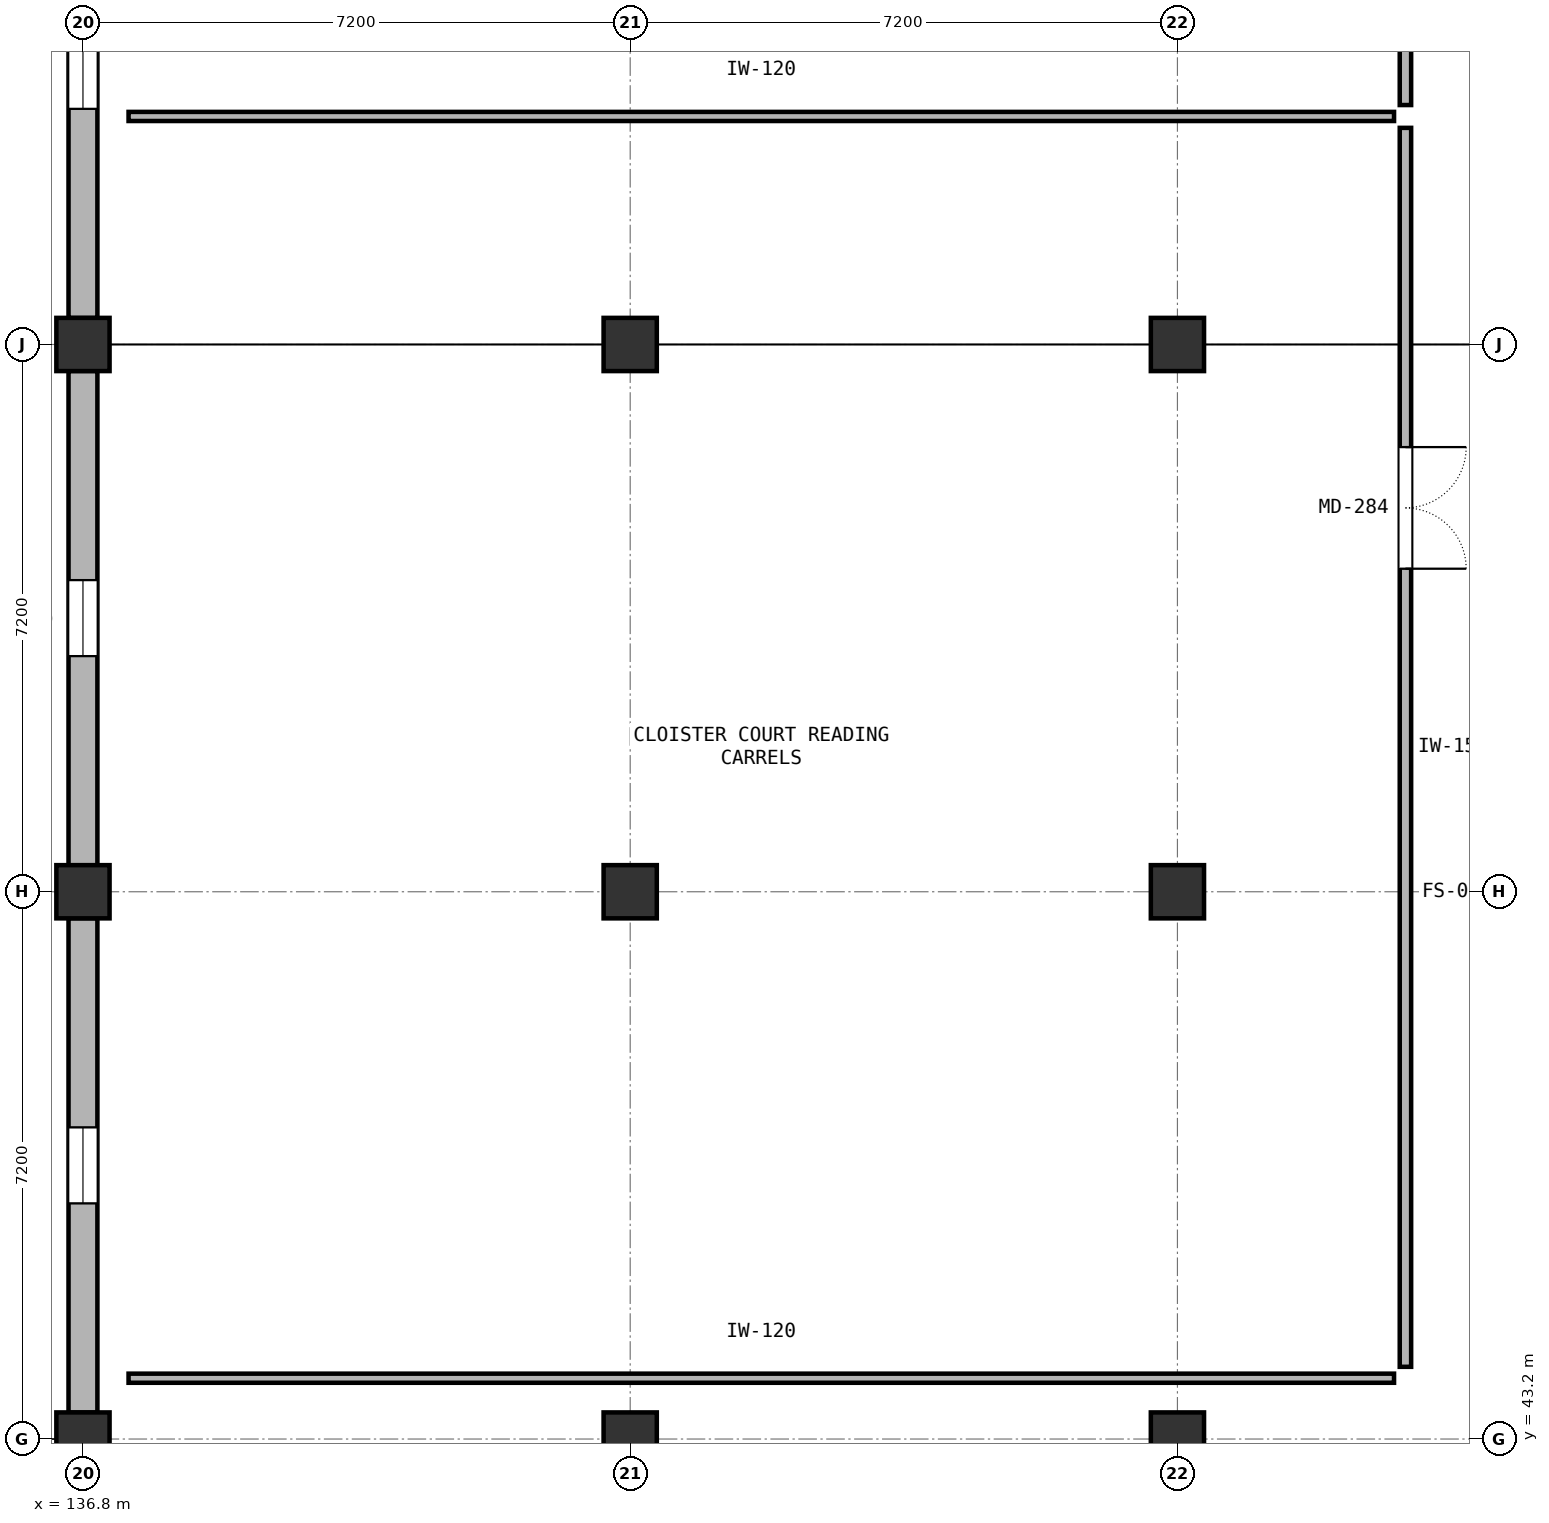
"""IFC4 building model, lengths in metres.
Left out: names, types, materials, properties, quantities, classifications, styles, units other than length and angle.
Written with IfcOpenShell. Run it as: python <this file> out.ifc"""

import sys

from ifc_helpers import new_model, si_unit, direction, frame, frame_2d, origin, origin_2d, place, context, subcontext, project, spatial, rectangle, extrude, element, fill, save


model = new_model("IFC4")
c1 = context("Model", 3, precision=1e-05, world=origin(), true_north=direction((0.0, 1.0)))
c2 = subcontext(c1, "Body", "Model", "MODEL_VIEW")
j1 = project(units=[si_unit("LENGTHUNIT", "METRE"), si_unit("PLANEANGLEUNIT", "RADIAN")], contexts=[c1])
p1 = place(None, origin())
s1 = spatial("IfcSite", under=j1, at=p1, CompositionType="ELEMENT")
p2 = place(p1, origin())
s2 = spatial("IfcBuilding", under=s1, at=p2, CompositionType="ELEMENT")
p3 = place(p2, frame((0.0, 0.0, 10.2)))
s3 = spatial("IfcBuildingStorey", under=s2, at=p3, CompositionType="ELEMENT", Elevation=10.2)
for number, where, z_axis, x_axis in (
    (1, (136.8, 43.2, 0.0), (0.0, 0.0, 1.0), (1.0, 0.0, 0.0)),
    (2, (136.8, 50.4, 0.0), (0.0, 0.0, 1.0), (1.0, 0.0, 0.0)),
    (3, (136.8, 57.6, 0.0), (0.0, 0.0, 1.0), (1.0, 0.0, 0.0)),
    (4, (144.0, 43.2, 0.0), (0.0, 0.0, 1.0), (1.0, 0.0, 0.0)),
    (5, (144.0, 50.4, 0.0), (0.0, 0.0, 1.0), (1.0, 0.0, 0.0)),
    (6, (144.0, 57.6, 0.0), (0.0, 0.0, 1.0), (1.0, 0.0, 0.0)),
    (7, (151.2, 43.2, 0.0), (0.0, 0.0, 1.0), (1.0, 0.0, 0.0)),
    (8, (151.2, 50.4, 0.0), (0.0, 0.0, 1.0), (1.0, 0.0, 0.0)),
    (9, (151.2, 57.6, 0.0), (0.0, 0.0, 1.0), (1.0, 0.0, 0.0)),
):
    element("IfcColumn", number, at=place(p3, frame(where, z_axis=z_axis, x_axis=x_axis)), inside=s3, PredefinedType="COLUMN", context=c2, shape_type="SweptSolid", body=[
        extrude(rectangle(XDim=0.7, YDim=0.7, at=origin_2d()), origin(), (0.0, 0.0, 1.0), 4.2),
    ])
p4 = place(p3, frame((136.8, 43.548, 0.0), z_axis=(0.0, 0.0, 1.0), x_axis=(0.0, 1.0, 0.0)))
e10 = element("IfcWall", 10, at=p4, inside=s3, PredefinedType="SOLIDWALL", context=c2, shape_type="SweptSolid", body=[
    extrude(rectangle(XDim=6.504, YDim=0.38, at=frame_2d((3.252, 0.0))), origin(), (0.0, 0.0, 1.0), 3.04),
])
p5 = place(p4, frame((2.752, 0.0, 0.7)))
e11 = element("IfcOpeningElement", 11, at=p5, cuts=e10, PredefinedType="OPENING", context=c2, shape_type="SweptSolid", body=[
    extrude(rectangle(XDim=1.0, YDim=2.0, at=frame_2d((0.5, 1.0))), frame((0.0, 0.2, 0.0), z_axis=(0.0, -1.0, 0.0), x_axis=(1.0, 0.0, 0.0)), (0.0, 0.0, 1.0), 0.4),
])
p6 = place(p3, frame((136.8, 50.748, 0.0), z_axis=(0.0, 0.0, 1.0), x_axis=(0.0, 1.0, 0.0)))
e12 = element("IfcWall", 12, at=p6, inside=s3, PredefinedType="SOLIDWALL", context=c2, shape_type="SweptSolid", body=[
    extrude(rectangle(XDim=6.504, YDim=0.38, at=frame_2d((3.252, 0.0))), origin(), (0.0, 0.0, 1.0), 3.04),
])
p7 = place(p6, frame((2.752, 0.0, 0.7)))
e13 = element("IfcOpeningElement", 13, at=p7, cuts=e12, PredefinedType="OPENING", context=c2, shape_type="SweptSolid", body=[
    extrude(rectangle(XDim=1.0, YDim=2.0, at=frame_2d((0.5, 1.0))), frame((0.0, 0.2, 0.0), z_axis=(0.0, -1.0, 0.0), x_axis=(1.0, 0.0, 0.0)), (0.0, 0.0, 1.0), 0.4),
])
p8 = place(p3, frame((136.8, 57.948, 0.0), z_axis=(0.0, 0.0, 1.0), x_axis=(0.0, 1.0, 0.0)))
e14 = element("IfcWall", 14, at=p8, inside=s3, PredefinedType="SOLIDWALL", context=c2, shape_type="SweptSolid", body=[
    extrude(rectangle(XDim=6.504, YDim=0.38, at=frame_2d((3.252, 0.0))), origin(), (0.0, 0.0, 1.0), 3.04),
])
p9 = place(p8, frame((2.752, 0.0, 0.7)))
e15 = element("IfcOpeningElement", 15, at=p9, cuts=e14, PredefinedType="OPENING", context=c2, shape_type="SweptSolid", body=[
    extrude(rectangle(XDim=1.0, YDim=2.0, at=frame_2d((0.5, 1.0))), frame((0.0, 0.2, 0.0), z_axis=(0.0, -1.0, 0.0), x_axis=(1.0, 0.0, 0.0)), (0.0, 0.0, 1.0), 0.4),
])
p10 = place(p3, frame((154.2, 60.45, 0.0), z_axis=(0.0, 0.0, 1.0), x_axis=(0.0, -1.0, 0.0)))
e16 = element("IfcWall", 16, at=p10, inside=s3, PredefinedType="PARTITIONING", context=c2, shape_type="SweptSolid", body=[
    extrude(rectangle(XDim=16.3, YDim=0.15, at=frame_2d((8.15, 0.0))), origin(), (0.0, 0.0, 1.0), 3.08),
])
p11 = place(p10, frame((4.2, 0.0, 0.0)))
e17 = element("IfcOpeningElement", 17, at=p11, cuts=e16, PredefinedType="OPENING", context=c2, shape_type="SweptSolid", body=[
    extrude(rectangle(XDim=1.6, YDim=2.2, at=frame_2d((0.8, 1.1))), frame((0.0, 0.085, 0.0), z_axis=(0.0, -1.0, 0.0), x_axis=(1.0, 0.0, 0.0)), (0.0, 0.0, 1.0), 0.17),
])
p12 = place(p3, frame((137.4, 44.0, 0.0), z_axis=(0.0, 0.0, 1.0), x_axis=(1.0, 0.0, 0.0)))
e18 = element("IfcWall", 18, at=p12, inside=s3, PredefinedType="PARTITIONING", context=c2, shape_type="SweptSolid", body=[
    extrude(rectangle(XDim=16.65, YDim=0.12, at=frame_2d((8.325, 0.0))), origin(), (0.0, 0.0, 1.0), 3.08),
])
p13 = place(p3, frame((154.2, 78.25, 0.0), z_axis=(0.0, 0.0, 1.0), x_axis=(0.0, -1.0, 0.0)))
e19 = element("IfcWall", 19, at=p13, inside=s3, PredefinedType="PARTITIONING", context=c2, shape_type="SweptSolid", body=[
    extrude(rectangle(XDim=17.5, YDim=0.15, at=frame_2d((8.75, 0.0))), origin(), (0.0, 0.0, 1.0), 3.08),
])
p14 = place(p13, frame((4.2, 0.0, 0.0)))
e20 = element("IfcOpeningElement", 20, at=p14, cuts=e19, PredefinedType="OPENING", context=c2, shape_type="SweptSolid", body=[
    extrude(rectangle(XDim=1.6, YDim=2.2, at=frame_2d((0.8, 1.1))), frame((0.0, 0.085, 0.0), z_axis=(0.0, -1.0, 0.0), x_axis=(1.0, 0.0, 0.0)), (0.0, 0.0, 1.0), 0.17),
])
p15 = place(p3, frame((137.4, 60.6, 0.0), z_axis=(0.0, 0.0, 1.0), x_axis=(1.0, 0.0, 0.0)))
e21 = element("IfcWall", 21, at=p15, inside=s3, PredefinedType="PARTITIONING", context=c2, shape_type="SweptSolid", body=[
    extrude(rectangle(XDim=16.65, YDim=0.12, at=frame_2d((8.325, 0.0))), origin(), (0.0, 0.0, 1.0), 3.08),
])
p16 = place(p5, origin())
e22 = element("IfcWindow", 22, at=p16, inside=s3, PartitioningType="SINGLE_PANEL", PredefinedType="WINDOW", context=c2, shape_type="SweptSolid", body=[
    extrude(rectangle(XDim=1.0, YDim=2.0, at=frame_2d((0.5, 1.0))), frame((0.0, 0.03, 0.0), z_axis=(0.0, -1.0, 0.0), x_axis=(1.0, 0.0, 0.0)), (0.0, 0.0, 1.0), 0.06),
])
fill(e11, e22)
p17 = place(p7, origin())
e23 = element("IfcWindow", 23, at=p17, inside=s3, PartitioningType="SINGLE_PANEL", PredefinedType="WINDOW", context=c2, shape_type="SweptSolid", body=[
    extrude(rectangle(XDim=1.0, YDim=2.0, at=frame_2d((0.5, 1.0))), frame((0.0, 0.03, 0.0), z_axis=(0.0, -1.0, 0.0), x_axis=(1.0, 0.0, 0.0)), (0.0, 0.0, 1.0), 0.06),
])
fill(e13, e23)
p18 = place(p9, origin())
e24 = element("IfcWindow", 24, at=p18, inside=s3, PartitioningType="SINGLE_PANEL", PredefinedType="WINDOW", context=c2, shape_type="SweptSolid", body=[
    extrude(rectangle(XDim=1.0, YDim=2.0, at=frame_2d((0.5, 1.0))), frame((0.0, 0.03, 0.0), z_axis=(0.0, -1.0, 0.0), x_axis=(1.0, 0.0, 0.0)), (0.0, 0.0, 1.0), 0.06),
])
fill(e15, e24)
p19 = place(p11, origin())
e25 = element("IfcDoor", 25, at=p19, inside=s3, OperationType="DOUBLE_DOOR_SINGLE_SWING", PredefinedType="DOOR", context=c2, shape_type="SweptSolid", body=[
    extrude(rectangle(XDim=1.6, YDim=2.2, at=frame_2d((0.8, 1.1))), frame((0.0, 0.025, 0.0), z_axis=(0.0, -1.0, 0.0), x_axis=(1.0, 0.0, 0.0)), (0.0, 0.0, 1.0), 0.05),
])
fill(e17, e25)
save(model, sys.argv[1])
